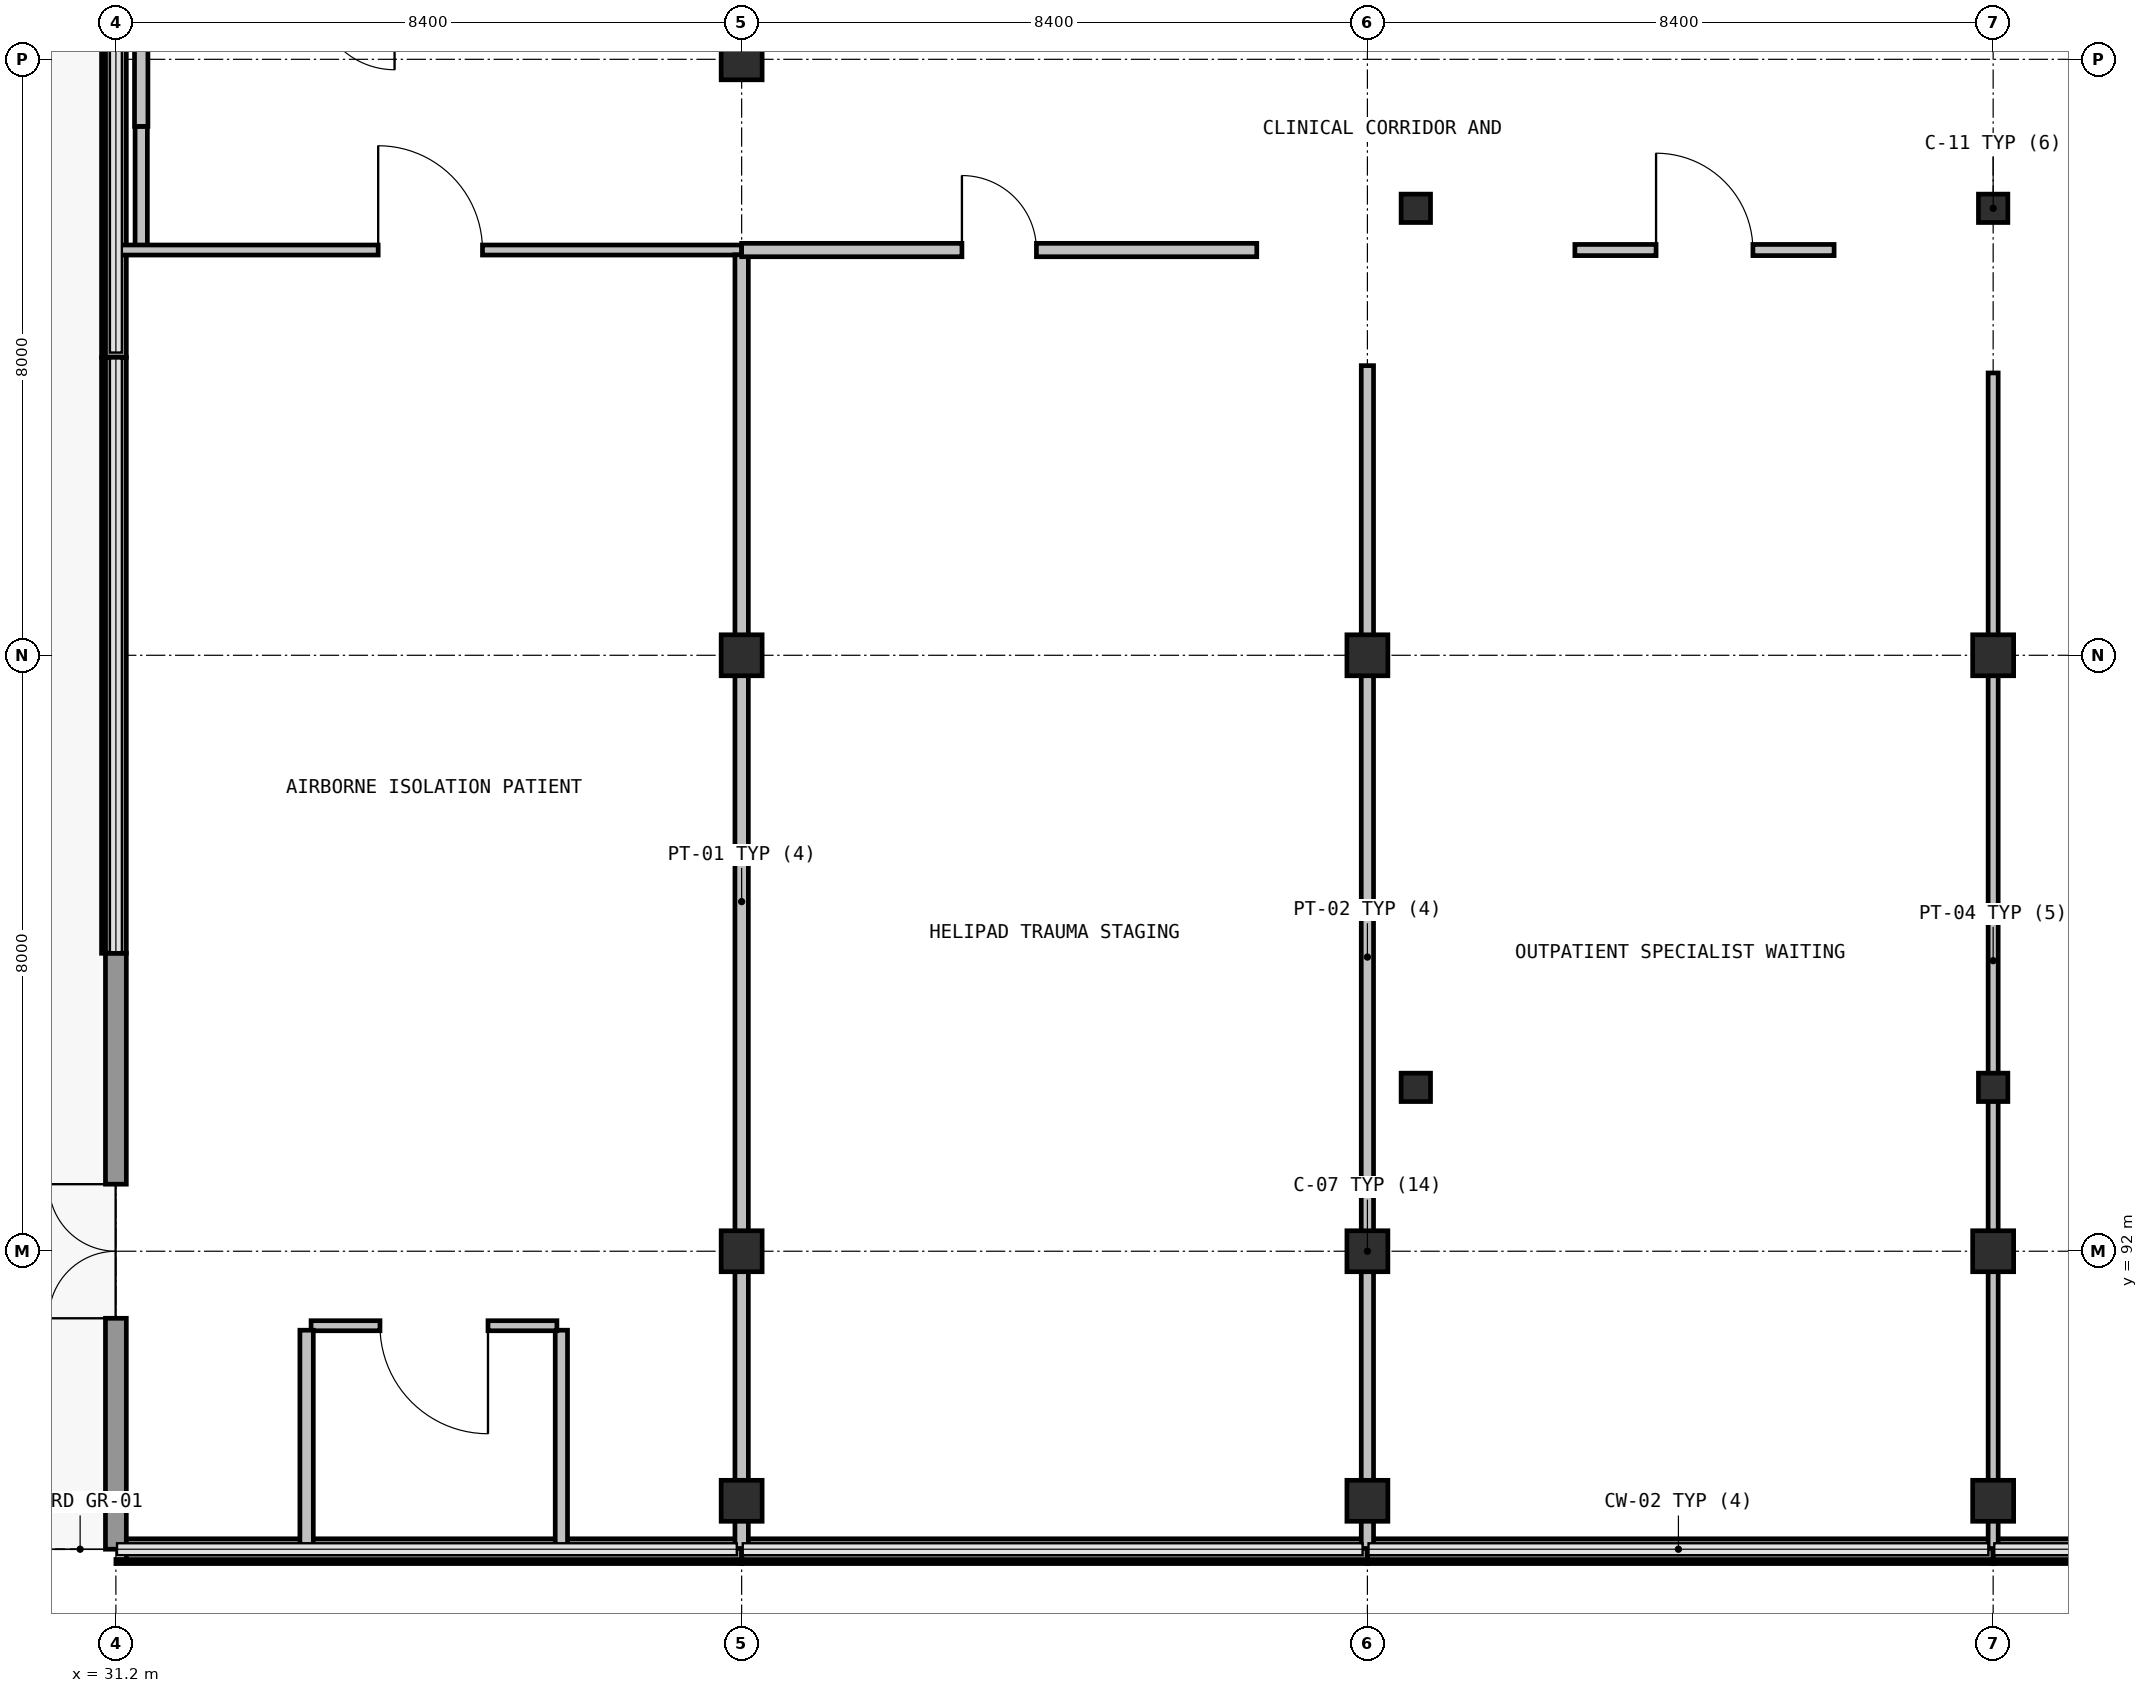
"""IFC4 building model, lengths in metres.
Left out: names, types, materials, properties, quantities, classifications, styles, units other than length and angle.
Written with IfcOpenShell. Run it as: python <this file> out.ifc"""

import sys

from ifc_helpers import new_model, si_unit, direction, frame, frame_2d, origin, origin_2d, place, context, subcontext, project, spatial, rectangle, i_section, extrude, element, fill, save


model = new_model("IFC4")
c1 = context("Model", 3, precision=1e-05, world=origin(), true_north=direction((0.0, 1.0)))
c2 = subcontext(c1, "Body", "Model", "MODEL_VIEW")
j1 = project(units=[si_unit("LENGTHUNIT", "METRE"), si_unit("PLANEANGLEUNIT", "RADIAN")], contexts=[c1])
p1 = place(None, origin())
s1 = spatial("IfcSite", under=j1, at=p1, CompositionType="ELEMENT")
p2 = place(p1, origin())
s2 = spatial("IfcBuilding", under=s1, at=p2, CompositionType="ELEMENT")
p3 = place(p2, frame((0.0, 0.0, 35.4)))
s3 = spatial("IfcBuildingStorey", under=s2, at=p3, CompositionType="ELEMENT", Elevation=35.4)
for number, where, z_axis, x_axis in (
    (1, (48.65, 94.2, 0.0), (0.0, 0.0, 1.0), (1.0, 0.0, 0.0)),
    (2, (56.4, 94.2, 0.0), (0.0, 0.0, 1.0), (1.0, 0.0, 0.0)),
    (3, (48.65, 106.0, 0.0), (0.0, 0.0, 1.0), (1.0, 0.0, 0.0)),
    (4, (56.4, 106.0, 0.0), (0.0, 0.0, 1.0), (1.0, 0.0, 0.0)),
):
    element("IfcColumn", number, at=place(p3, frame(where, z_axis=z_axis, x_axis=x_axis)), inside=s3, PredefinedType="COLUMN", context=c2, shape_type="SweptSolid", body=[
        extrude(i_section(OverallWidth=0.395, OverallDepth=0.381, WebThickness=0.018, FlangeThickness=0.03, at=origin_2d()), origin(), (0.0, 0.0, 1.0), 4.05),
    ])
for number, where, z_axis, x_axis in (
    (5, (39.6, 88.65, 0.0), (0.0, 0.0, 1.0), (1.0, 0.0, 0.0)),
    (6, (39.6, 92.0, 0.0), (0.0, 0.0, 1.0), (1.0, 0.0, 0.0)),
    (7, (39.6, 100.0, 0.0), (0.0, 0.0, 1.0), (1.0, 0.0, 0.0)),
    (8, (39.6, 108.0, 0.0), (0.0, 0.0, 1.0), (1.0, 0.0, 0.0)),
    (9, (48.0, 88.65, 0.0), (0.0, 0.0, 1.0), (1.0, 0.0, 0.0)),
    (10, (48.0, 92.0, 0.0), (0.0, 0.0, 1.0), (1.0, 0.0, 0.0)),
    (11, (48.0, 100.0, 0.0), (0.0, 0.0, 1.0), (1.0, 0.0, 0.0)),
    (12, (56.4, 88.65, 0.0), (0.0, 0.0, 1.0), (1.0, 0.0, 0.0)),
    (13, (56.4, 92.0, 0.0), (0.0, 0.0, 1.0), (1.0, 0.0, 0.0)),
    (14, (56.4, 100.0, 0.0), (0.0, 0.0, 1.0), (1.0, 0.0, 0.0)),
):
    element("IfcColumn", number, at=place(p3, frame(where, z_axis=z_axis, x_axis=x_axis)), inside=s3, PredefinedType="COLUMN", context=c2, shape_type="SweptSolid", body=[
        extrude(rectangle(XDim=0.55, YDim=0.55, at=origin_2d()), origin(), (0.0, 0.0, 1.0), 3.74),
    ])
p4 = place(p3, frame((31.2, 88.0, 0.0), z_axis=(0.0, 0.0, 1.0), x_axis=(0.0, 1.0, 0.0)))
e15 = element("IfcWall", 15, at=p4, inside=s3, PredefinedType="SOLIDWALL", context=c2, shape_type="SweptSolid", body=[
    extrude(rectangle(XDim=8.0, YDim=0.28, at=frame_2d((4.0, 0.0))), origin(), (0.0, 0.0, 1.0), 3.74),
])
p5 = place(p4, frame((3.1, 0.0, 0.0)))
e16 = element("IfcOpeningElement", 16, at=p5, cuts=e15, PredefinedType="OPENING", context=c2, shape_type="SweptSolid", body=[
    extrude(rectangle(XDim=1.8, YDim=2.2, at=frame_2d((0.9, 1.1))), frame((0.0, 0.15, 0.0), z_axis=(0.0, -1.0, 0.0), x_axis=(1.0, 0.0, 0.0)), (0.0, 0.0, 1.0), 0.3),
])
p6 = place(p3, frame((31.2, 96.002, 0.0), z_axis=(0.0, 0.0, 1.0), x_axis=(0.0, 1.0, 0.0)))
e17 = element("IfcWall", 17, at=p6, inside=s3, PredefinedType="SOLIDWALL", context=c2, shape_type="SweptSolid", body=[
    extrude(rectangle(XDim=7.995, YDim=0.28, at=frame_2d((3.998, 0.0))), origin(), (0.0, 0.0, 1.0), 0.94),
])
p7 = place(p3, frame((31.2, 104.001, 0.0), z_axis=(0.0, 0.0, 1.0), x_axis=(0.0, 1.0, 0.0)))
e18 = element("IfcWall", 18, at=p7, inside=s3, PredefinedType="SOLIDWALL", context=c2, shape_type="SweptSolid", body=[
    extrude(rectangle(XDim=7.996, YDim=0.28, at=frame_2d((3.998, 0.0))), origin(), (0.0, 0.0, 1.0), 0.94),
])
for number, where, z_axis, x_axis in (
    (19, (64.798, 88.0, 0.0), (0.0, 0.0, 1.0), (-1.0, 0.0, 0.0)),
    (20, (56.398, 88.0, 0.0), (0.0, 0.0, 1.0), (-1.0, 0.0, 0.0)),
    (21, (47.998, 88.0, 0.0), (0.0, 0.0, 1.0), (-1.0, 0.0, 0.0)),
):
    element("IfcWall", number, at=place(p3, frame(where, z_axis=z_axis, x_axis=x_axis)), inside=s3, PredefinedType="SOLIDWALL", context=c2, shape_type="SweptSolid", body=[
        extrude(rectangle(XDim=8.396, YDim=0.28, at=frame_2d((4.198, 0.0))), origin(), (0.0, 0.0, 1.0), 0.94),
    ])
p8 = place(p3, frame((39.598, 88.0, 0.0), z_axis=(0.0, 0.0, 1.0), x_axis=(-1.0, 0.0, 0.0)))
e22 = element("IfcWall", 22, at=p8, inside=s3, PredefinedType="SOLIDWALL", context=c2, shape_type="SweptSolid", body=[
    extrude(rectangle(XDim=8.258, YDim=0.28, at=frame_2d((4.129, 0.0))), origin(), (0.0, 0.0, 1.0), 0.94),
])
p9 = place(p3, frame((31.54, 107.1, 0.0), z_axis=(0.0, 0.0, 1.0), x_axis=(0.0, -1.0, 0.0)))
e23 = element("IfcWall", 23, at=p9, inside=s3, PredefinedType="PARTITIONING", context=c2, shape_type="SweptSolid", body=[
    extrude(rectangle(XDim=1.6, YDim=0.165, at=frame_2d((0.8, 0.0))), origin(), (0.0, 0.0, 1.0), 3.74),
])
p10 = place(p3, frame((31.242, 105.44, 0.0), z_axis=(0.0, 0.0, 1.0), x_axis=(1.0, 0.0, 0.0)))
e24 = element("IfcWall", 24, at=p10, inside=s3, PredefinedType="PARTITIONING", context=c2, shape_type="SweptSolid", body=[
    extrude(rectangle(XDim=8.358, YDim=0.135, at=frame_2d((4.179, 0.0))), origin(), (0.0, 0.0, 1.0), 3.74),
])
p11 = place(p10, frame((3.479, 0.0, 0.0)))
e25 = element("IfcOpeningElement", 25, at=p11, cuts=e24, PredefinedType="OPENING", context=c2, shape_type="SweptSolid", body=[
    extrude(rectangle(XDim=1.4, YDim=2.15, at=frame_2d((0.7, 1.075))), frame((0.0, 0.077, 0.0), z_axis=(0.0, -1.0, 0.0), x_axis=(1.0, 0.0, 0.0)), (0.0, 0.0, 1.0), 0.155),
])
p12 = place(p3, frame((39.6, 105.376, 0.0), z_axis=(0.0, 0.0, 1.0), x_axis=(0.0, -1.0, 0.0)))
e26 = element("IfcWall", 26, at=p12, inside=s3, PredefinedType="PARTITIONING", context=c2, shape_type="SweptSolid", body=[
    extrude(rectangle(XDim=17.366, YDim=0.18, at=frame_2d((8.683, 0.0))), origin(), (0.0, 0.0, 1.0), 3.14),
])
p13 = place(p3, frame((37.18, 88.042, 0.0), z_axis=(0.0, 0.0, 1.0), x_axis=(0.0, 1.0, 0.0)))
e27 = element("IfcWall", 27, at=p13, inside=s3, PredefinedType="PARTITIONING", context=c2, shape_type="SweptSolid", body=[
    extrude(rectangle(XDim=2.898, YDim=0.165, at=frame_2d((1.449, 0.0))), origin(), (0.0, 0.0, 1.0), 3.74),
])
p14 = place(p3, frame((37.12, 91.0, 0.0), z_axis=(0.0, 0.0, 1.0), x_axis=(-1.0, 0.0, 0.0)))
e28 = element("IfcWall", 28, at=p14, inside=s3, PredefinedType="PARTITIONING", context=c2, shape_type="SweptSolid", body=[
    extrude(rectangle(XDim=3.3, YDim=0.135, at=frame_2d((1.65, 0.0))), origin(), (0.0, 0.0, 1.0), 3.74),
])
p15 = place(p14, frame((0.925, 0.0, 0.0)))
e29 = element("IfcOpeningElement", 29, at=p15, cuts=e28, PredefinedType="OPENING", context=c2, shape_type="SweptSolid", body=[
    extrude(rectangle(XDim=1.45, YDim=2.15, at=frame_2d((0.725, 1.075))), frame((0.0, 0.077, 0.0), z_axis=(0.0, -1.0, 0.0), x_axis=(1.0, 0.0, 0.0)), (0.0, 0.0, 1.0), 0.155),
])
p16 = place(p3, frame((33.76, 90.94, 0.0), z_axis=(0.0, 0.0, 1.0), x_axis=(0.0, -1.0, 0.0)))
e30 = element("IfcWall", 30, at=p16, inside=s3, PredefinedType="PARTITIONING", context=c2, shape_type="SweptSolid", body=[
    extrude(rectangle(XDim=2.898, YDim=0.18, at=frame_2d((1.449, 0.0))), origin(), (0.0, 0.0, 1.0), 3.74),
])
p17 = place(p3, frame((39.6, 105.44, 0.0), z_axis=(0.0, 0.0, 1.0), x_axis=(1.0, 0.0, 0.0)))
e31 = element("IfcWall", 31, at=p17, inside=s3, PredefinedType="PARTITIONING", context=c2, shape_type="SweptSolid", body=[
    extrude(rectangle(XDim=6.915, YDim=0.18, at=frame_2d((3.458, 0.0))), origin(), (0.0, 0.0, 1.0), 3.74),
])
p18 = place(p17, frame((2.957, 0.0, 0.0)))
e32 = element("IfcOpeningElement", 32, at=p18, cuts=e31, PredefinedType="OPENING", context=c2, shape_type="SweptSolid", body=[
    extrude(rectangle(XDim=1.0, YDim=2.15, at=frame_2d((0.5, 1.075))), frame((0.0, 0.1, 0.0), z_axis=(0.0, -1.0, 0.0), x_axis=(1.0, 0.0, 0.0)), (0.0, 0.0, 1.0), 0.2),
])
p19 = place(p3, frame((48.0, 103.888, 0.0), z_axis=(0.0, 0.0, 1.0), x_axis=(0.0, -1.0, 0.0)))
e33 = element("IfcWall", 33, at=p19, inside=s3, PredefinedType="PARTITIONING", context=c2, shape_type="SweptSolid", body=[
    extrude(rectangle(XDim=15.878, YDim=0.165, at=frame_2d((7.939, 0.0))), origin(), (0.0, 0.0, 1.0), 3.14),
])
p20 = place(p3, frame((50.785, 105.44, 0.0), z_axis=(0.0, 0.0, 1.0), x_axis=(1.0, 0.0, 0.0)))
e34 = element("IfcWall", 34, at=p20, inside=s3, PredefinedType="PARTITIONING", context=c2, shape_type="SweptSolid", body=[
    extrude(rectangle(XDim=3.48, YDim=0.15, at=frame_2d((1.74, 0.0))), origin(), (0.0, 0.0, 1.0), 3.74),
])
p21 = place(p20, frame((1.09, 0.0, 0.0)))
e35 = element("IfcOpeningElement", 35, at=p21, cuts=e34, PredefinedType="OPENING", context=c2, shape_type="SweptSolid", body=[
    extrude(rectangle(XDim=1.3, YDim=2.15, at=frame_2d((0.65, 1.075))), frame((0.0, 0.085, 0.0), z_axis=(0.0, -1.0, 0.0), x_axis=(1.0, 0.0, 0.0)), (0.0, 0.0, 1.0), 0.17),
])
p22 = place(p3, frame((56.4, 103.79, 0.0), z_axis=(0.0, 0.0, 1.0), x_axis=(0.0, -1.0, 0.0)))
e36 = element("IfcWall", 36, at=p22, inside=s3, PredefinedType="PARTITIONING", context=c2, shape_type="SweptSolid", body=[
    extrude(rectangle(XDim=15.78, YDim=0.135, at=frame_2d((7.89, 0.0))), origin(), (0.0, 0.0, 1.0), 3.14),
])
p23 = place(p3, frame((31.54, 108.854, 0.0), z_axis=(0.0, 0.0, 1.0), x_axis=(0.0, -1.0, 0.0)))
e37 = element("IfcWall", 37, at=p23, inside=s3, PredefinedType="PARTITIONING", context=c2, shape_type="SweptSolid", body=[
    extrude(rectangle(XDim=1.754, YDim=0.18, at=frame_2d((0.877, 0.0))), origin(), (0.0, 0.0, 1.0), 3.74),
])
p24 = place(p5, origin())
e38 = element("IfcDoor", 38, at=p24, inside=s3, OperationType="DOUBLE_DOOR_SINGLE_SWING", PredefinedType="DOOR", context=c2, shape_type="SweptSolid", body=[
    extrude(rectangle(XDim=1.8, YDim=2.2, at=frame_2d((0.9, 1.1))), frame((0.0, 0.025, 0.0), z_axis=(0.0, -1.0, 0.0), x_axis=(1.0, 0.0, 0.0)), (0.0, 0.0, 1.0), 0.05),
])
fill(e16, e38)
p25 = place(p11, origin())
e39 = element("IfcDoor", 39, at=p25, inside=s3, OperationType="SINGLE_SWING_LEFT", PredefinedType="DOOR", context=c2, shape_type="SweptSolid", body=[
    extrude(rectangle(XDim=1.4, YDim=2.15, at=frame_2d((0.7, 1.075))), frame((0.0, 0.025, 0.0), z_axis=(0.0, -1.0, 0.0), x_axis=(1.0, 0.0, 0.0)), (0.0, 0.0, 1.0), 0.05),
])
fill(e25, e39)
p26 = place(p15, origin())
e40 = element("IfcDoor", 40, at=p26, inside=s3, OperationType="SINGLE_SWING_RIGHT", PredefinedType="DOOR", context=c2, shape_type="SweptSolid", body=[
    extrude(rectangle(XDim=1.45, YDim=2.15, at=frame_2d((0.725, 1.075))), frame((0.0, 0.025, 0.0), z_axis=(0.0, -1.0, 0.0), x_axis=(1.0, 0.0, 0.0)), (0.0, 0.0, 1.0), 0.05),
])
fill(e29, e40)
p27 = place(p18, origin())
e41 = element("IfcDoor", 41, at=p27, inside=s3, OperationType="SINGLE_SWING_LEFT", PredefinedType="DOOR", context=c2, shape_type="SweptSolid", body=[
    extrude(rectangle(XDim=1.0, YDim=2.15, at=frame_2d((0.5, 1.075))), frame((0.0, 0.025, 0.0), z_axis=(0.0, -1.0, 0.0), x_axis=(1.0, 0.0, 0.0)), (0.0, 0.0, 1.0), 0.05),
])
fill(e32, e41)
p28 = place(p21, origin())
e42 = element("IfcDoor", 42, at=p28, inside=s3, OperationType="SINGLE_SWING_RIGHT", PredefinedType="DOOR", context=c2, shape_type="SweptSolid", body=[
    extrude(rectangle(XDim=1.3, YDim=2.15, at=frame_2d((0.65, 1.075))), frame((0.0, 0.025, 0.0), z_axis=(0.0, -1.0, 0.0), x_axis=(1.0, 0.0, 0.0)), (0.0, 0.0, 1.0), 0.05),
])
fill(e35, e42)
save(model, sys.argv[1])
